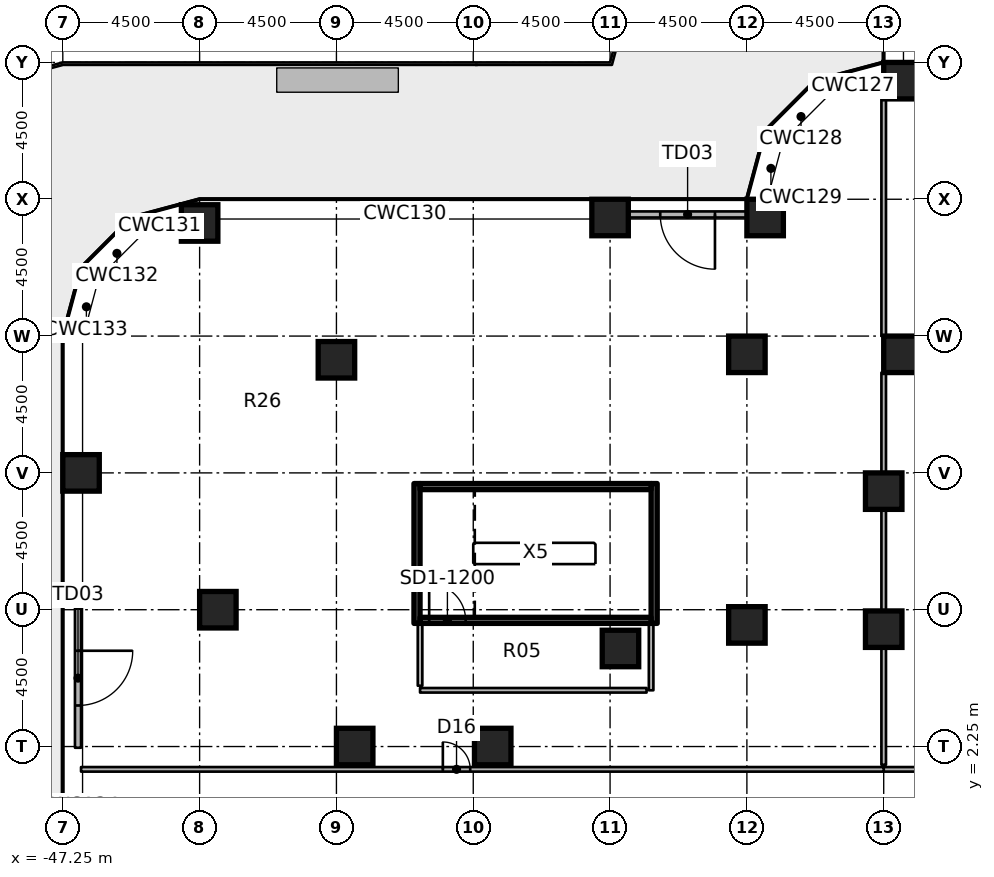
"""IFC4 building model, lengths in metres.
Left out: names, types, materials, properties, quantities, classifications, styles, units other than length and angle.
Written with IfcOpenShell. Run it as: python <this file> out.ifc"""

import sys

from ifc_helpers import new_model, si_unit, direction, frame, frame_2d, origin, origin_2d, place, context, subcontext, project, spatial, rectangle, extrude, element, fill, save


model = new_model("IFC4")
c1 = context("Model", 3, precision=1e-05, world=origin(), true_north=direction((0.0, 1.0)))
c2 = subcontext(c1, "Body", "Model", "MODEL_VIEW")
j1 = project(units=[si_unit("LENGTHUNIT", "METRE"), si_unit("PLANEANGLEUNIT", "RADIAN")], contexts=[c1])
p1 = place(None, origin())
s1 = spatial("IfcSite", under=j1, at=p1, CompositionType="ELEMENT")
p2 = place(p1, origin())
s2 = spatial("IfcBuilding", under=s1, at=p2, CompositionType="ELEMENT")
p3 = place(p2, frame((0.0, 0.0, 12.0)))
s3 = spatial("IfcBuildingStorey", under=s2, at=p3, CompositionType="ELEMENT", Elevation=12.0)
for number, where, z_axis, x_axis in (
    (1, (-46.65, 11.25, 0.0), (0.0, 0.0, 1.0), (1.0, 0.0, 0.0)),
    (2, (-42.15, 6.75, 0.0), (0.0, 0.0, 1.0), (1.0, 0.0, 0.0)),
    (3, (-42.75, 19.47, 0.0), (0.0, 0.0, 1.0), (1.0, 0.0, 0.0)),
    (4, (-37.65, 2.25, 0.0), (0.0, 0.0, 1.0), (1.0, 0.0, 0.0)),
    (5, (-38.25, 14.97, 0.0), (0.0, 0.0, 1.0), (1.0, 0.0, 0.0)),
    (6, (-33.11, 2.25, 0.0), (0.0, 0.0, 1.0), (1.0, 0.0, 0.0)),
    (7, (-28.908, 5.475, 0.0), (0.0, 0.0, 1.0), (1.0, 0.0, 0.0)),
    (8, (-29.25, 19.65, 0.0), (0.0, 0.0, 1.0), (1.0, 0.0, 0.0)),
    (9, (-24.75, 6.25, 0.0), (0.0, 0.0, 1.0), (1.0, 0.0, 0.0)),
    (10, (-24.75, 15.15, 0.0), (0.0, 0.0, 1.0), (1.0, 0.0, 0.0)),
    (11, (-24.15, 19.65, 0.0), (0.0, 0.0, 1.0), (1.0, 0.0, 0.0)),
    (12, (-20.25, 6.11, 0.0), (0.0, 0.0, 1.0), (1.0, 0.0, 0.0)),
    (13, (-20.25, 10.65, 0.0), (0.0, 0.0, 1.0), (1.0, 0.0, 0.0)),
    (14, (-19.65, 15.15, 0.0), (0.0, 0.0, 1.0), (1.0, 0.0, 0.0)),
    (15, (-19.65, 24.15, 0.0), (0.0, 0.0, 1.0), (1.0, 0.0, 0.0)),
):
    element("IfcColumn", number, at=place(p3, frame(where, z_axis=z_axis, x_axis=x_axis)), inside=s3, PredefinedType="COLUMN", context=c2, shape_type="SweptSolid", body=[
        extrude(rectangle(XDim=1.2, YDim=1.2, at=origin_2d()), origin(), (0.0, 0.0, 1.0), 4.55),
    ])
p4 = place(p3, frame((-24.75, 19.75, 0.0), z_axis=(0.0, 0.0, 1.0), x_axis=(-1.0, 0.0, 0.0)))
e16 = element("IfcWall", 16, at=p4, inside=s3, PredefinedType="SOLIDWALL", context=c2, shape_type="SweptSolid", body=[
    extrude(rectangle(XDim=3.9, YDim=0.2, at=frame_2d((1.95, 0.0))), origin(), (0.0, 0.0, 1.0), 4.55),
])
p5 = place(p4, frame((1.05, 0.0, 0.0)))
e17 = element("IfcOpeningElement", 17, at=p5, cuts=e16, PredefinedType="OPENING", context=c2, shape_type="SweptSolid", body=[
    extrude(rectangle(XDim=1.8, YDim=2.4, at=frame_2d((0.9, 1.2))), frame((0.0, 0.11, 0.0), z_axis=(0.0, -1.0, 0.0), x_axis=(1.0, 0.0, 0.0)), (0.0, 0.0, 1.0), 0.22),
])
p6 = place(p3, frame((-46.75, 6.79, 0.0), z_axis=(0.0, 0.0, 1.0), x_axis=(0.0, -1.0, 0.0)))
e18 = element("IfcWall", 18, at=p6, inside=s3, PredefinedType="SOLIDWALL", context=c2, shape_type="SweptSolid", body=[
    extrude(rectangle(XDim=4.58, YDim=0.2, at=frame_2d((2.29, 0.0))), origin(), (0.0, 0.0, 1.0), 4.55),
])
p7 = place(p6, frame((1.39, 0.0, 0.0)))
e19 = element("IfcOpeningElement", 19, at=p7, cuts=e18, PredefinedType="OPENING", context=c2, shape_type="SweptSolid", body=[
    extrude(rectangle(XDim=1.8, YDim=2.4, at=frame_2d((0.9, 1.2))), frame((0.0, 0.11, 0.0), z_axis=(0.0, -1.0, 0.0), x_axis=(1.0, 0.0, 0.0)), (0.0, 0.0, 1.0), 0.22),
])
for number, where, z_axis, x_axis in (
    (20, (-35.6, 6.3, 0.0), (0.0, 0.0, 1.0), (0.0, 1.0, 0.0)),
    (21, (-27.8, 6.3, 0.0), (0.0, 0.0, 1.0), (0.0, 1.0, 0.0)),
):
    element("IfcWall", number, at=place(p3, frame(where, z_axis=z_axis, x_axis=x_axis)), inside=s3, PredefinedType="SHEAR", context=c2, shape_type="SweptSolid", body=[
        extrude(rectangle(XDim=4.6, YDim=0.2, at=frame_2d((2.3, 0.0))), origin(), (0.0, 0.0, 1.0), 4.55),
    ])
p8 = place(p3, frame((-35.5, 6.4, 0.0), z_axis=(0.0, 0.0, 1.0), x_axis=(1.0, 0.0, 0.0)))
e22 = element("IfcWall", 22, at=p8, inside=s3, PredefinedType="SHEAR", context=c2, shape_type="SweptSolid", body=[
    extrude(rectangle(XDim=7.6, YDim=0.2, at=frame_2d((3.8, 0.0))), origin(), (0.0, 0.0, 1.0), 4.55),
])
p9 = place(p8, frame((0.3, 0.0, 0.0)))
e23 = element("IfcOpeningElement", 23, at=p9, cuts=e22, PredefinedType="OPENING", context=c2, shape_type="SweptSolid", body=[
    extrude(rectangle(XDim=1.2, YDim=2.1, at=frame_2d((0.6, 1.05))), frame((0.0, 0.11, 0.0), z_axis=(0.0, -1.0, 0.0), x_axis=(1.0, 0.0, 0.0)), (0.0, 0.0, 1.0), 0.22),
])
p10 = place(p3, frame((-35.5, 10.8, 0.0), z_axis=(0.0, 0.0, 1.0), x_axis=(1.0, 0.0, 0.0)))
e24 = element("IfcWall", 24, at=p10, inside=s3, PredefinedType="SHEAR", context=c2, shape_type="SweptSolid", body=[
    extrude(rectangle(XDim=7.6, YDim=0.2, at=frame_2d((3.8, 0.0))), origin(), (0.0, 0.0, 1.0), 4.55),
])
p11 = place(p3, frame((-27.9, 6.3, 0.0), z_axis=(0.0, 0.0, 1.0), x_axis=(0.0, -1.0, 0.0)))
e25 = element("IfcWall", 25, at=p11, inside=s3, PredefinedType="PARTITIONING", context=c2, shape_type="SweptSolid", body=[
    extrude(rectangle(XDim=2.2, YDim=0.15, at=frame_2d((1.1, 0.0))), origin(), (0.0, 0.0, 1.0), 4.55),
])
p12 = place(p3, frame((-28.05, 4.1, 0.0), z_axis=(0.0, 0.0, 1.0), x_axis=(-1.0, 0.0, 0.0)))
e26 = element("IfcWall", 26, at=p12, inside=s3, PredefinedType="PARTITIONING", context=c2, shape_type="SweptSolid", body=[
    extrude(rectangle(XDim=7.45, YDim=0.15, at=frame_2d((3.725, 0.0))), origin(), (0.0, 0.0, 1.0), 4.55),
])
p13 = place(p3, frame((-35.5, 4.25, 0.0), z_axis=(0.0, 0.0, 1.0), x_axis=(0.0, 1.0, 0.0)))
e27 = element("IfcWall", 27, at=p13, inside=s3, PredefinedType="PARTITIONING", context=c2, shape_type="SweptSolid", body=[
    extrude(rectangle(XDim=2.05, YDim=0.15, at=frame_2d((1.025, 0.0))), origin(), (0.0, 0.0, 1.0), 4.55),
])
p14 = place(p3, frame((-20.25, 1.5, 0.0), z_axis=(0.0, 0.0, 1.0), x_axis=(1.0, 0.0, 0.0)))
e28 = element("IfcWall", 28, at=p14, inside=s3, PredefinedType="PARTITIONING", context=c2, shape_type="SweptSolid", body=[
    extrude(rectangle(XDim=12.75, YDim=0.15, at=frame_2d((6.375, 0.0))), origin(), (0.0, 0.0, 1.0), 4.55),
])
p15 = place(p14, frame((8.0, 0.0, 0.0)))
e29 = element("IfcOpeningElement", 29, at=p15, cuts=e28, PredefinedType="OPENING", context=c2, shape_type="SweptSolid", body=[
    extrude(rectangle(XDim=1.0, YDim=2.1, at=frame_2d((0.5, 1.05))), frame((0.0, 0.085, 0.0), z_axis=(0.0, -1.0, 0.0), x_axis=(1.0, 0.0, 0.0)), (0.0, 0.0, 1.0), 0.17),
])
p16 = place(p3, frame((-46.65, 1.5, 0.0), z_axis=(0.0, 0.0, 1.0), x_axis=(1.0, 0.0, 0.0)))
e30 = element("IfcWall", 30, at=p16, inside=s3, PredefinedType="PARTITIONING", context=c2, shape_type="SweptSolid", body=[
    extrude(rectangle(XDim=26.4, YDim=0.15, at=frame_2d((13.2, 0.0))), origin(), (0.0, 0.0, 1.0), 4.55),
])
p17 = place(p16, frame((11.9, 0.0, 0.0)))
e31 = element("IfcOpeningElement", 31, at=p17, cuts=e30, PredefinedType="OPENING", context=c2, shape_type="SweptSolid", body=[
    extrude(rectangle(XDim=0.9, YDim=2.1, at=frame_2d((0.45, 1.05))), frame((0.0, 0.085, 0.0), z_axis=(0.0, -1.0, 0.0), x_axis=(1.0, 0.0, 0.0)), (0.0, 0.0, 1.0), 0.17),
])
p18 = place(p3, frame((-20.25, 1.65, 0.0), z_axis=(0.0, 0.0, 1.0), x_axis=(0.0, 1.0, 0.0)))
e32 = element("IfcWall", 32, at=p18, inside=s3, PredefinedType="PARTITIONING", context=c2, shape_type="SweptSolid", body=[
    extrude(rectangle(XDim=3.86, YDim=0.15, at=frame_2d((1.93, 0.0))), origin(), (0.0, 0.0, 1.0), 4.55),
])
p19 = place(p3, frame((-20.25, 6.71, 0.0), z_axis=(0.0, 0.0, 1.0), x_axis=(0.0, 1.0, 0.0)))
e33 = element("IfcWall", 33, at=p19, inside=s3, PredefinedType="PARTITIONING", context=c2, shape_type="SweptSolid", body=[
    extrude(rectangle(XDim=3.34, YDim=0.15, at=frame_2d((1.67, 0.0))), origin(), (0.0, 0.0, 1.0), 4.55),
])
p20 = place(p3, frame((-20.25, 11.25, 0.0), z_axis=(0.0, 0.0, 1.0), x_axis=(0.0, 1.0, 0.0)))
e34 = element("IfcWall", 34, at=p20, inside=s3, PredefinedType="PARTITIONING", context=c2, shape_type="SweptSolid", body=[
    extrude(rectangle(XDim=3.3, YDim=0.15, at=frame_2d((1.65, 0.0))), origin(), (0.0, 0.0, 1.0), 4.55),
])
p21 = place(p3, frame((-20.25, 15.75, 0.0), z_axis=(0.0, 0.0, 1.0), x_axis=(0.0, 1.0, 0.0)))
e35 = element("IfcWall", 35, at=p21, inside=s3, PredefinedType="PARTITIONING", context=c2, shape_type="SweptSolid", body=[
    extrude(rectangle(XDim=7.8, YDim=0.15, at=frame_2d((3.9, 0.0))), origin(), (0.0, 0.0, 1.0), 4.55),
])
p22 = place(p5, origin())
e36 = element("IfcDoor", 36, at=p22, inside=s3, OperationType="SINGLE_SWING_LEFT", PredefinedType="DOOR", context=c2, shape_type="SweptSolid", body=[
    extrude(rectangle(XDim=1.8, YDim=2.4, at=frame_2d((0.9, 1.2))), frame((0.0, 0.025, 0.0), z_axis=(0.0, -1.0, 0.0), x_axis=(1.0, 0.0, 0.0)), (0.0, 0.0, 1.0), 0.05),
])
fill(e17, e36)
p23 = place(p7, origin())
e37 = element("IfcDoor", 37, at=p23, inside=s3, OperationType="SINGLE_SWING_LEFT", PredefinedType="DOOR", context=c2, shape_type="SweptSolid", body=[
    extrude(rectangle(XDim=1.8, YDim=2.4, at=frame_2d((0.9, 1.2))), frame((0.0, 0.025, 0.0), z_axis=(0.0, -1.0, 0.0), x_axis=(1.0, 0.0, 0.0)), (0.0, 0.0, 1.0), 0.05),
])
fill(e19, e37)
p24 = place(p9, origin())
e38 = element("IfcDoor", 38, at=p24, inside=s3, OperationType="SINGLE_SWING_RIGHT", PredefinedType="DOOR", context=c2, shape_type="SweptSolid", body=[
    extrude(rectangle(XDim=1.2, YDim=2.1, at=frame_2d((0.6, 1.05))), frame((0.0, 0.025, 0.0), z_axis=(0.0, -1.0, 0.0), x_axis=(1.0, 0.0, 0.0)), (0.0, 0.0, 1.0), 0.05),
])
fill(e23, e38)
p25 = place(p17, origin())
e39 = element("IfcDoor", 39, at=p25, inside=s3, OperationType="SINGLE_SWING_LEFT", PredefinedType="DOOR", context=c2, shape_type="SweptSolid", body=[
    extrude(rectangle(XDim=0.9, YDim=2.1, at=frame_2d((0.45, 1.05))), frame((0.0, 0.025, 0.0), z_axis=(0.0, -1.0, 0.0), x_axis=(1.0, 0.0, 0.0)), (0.0, 0.0, 1.0), 0.05),
])
fill(e31, e39)
save(model, sys.argv[1])
